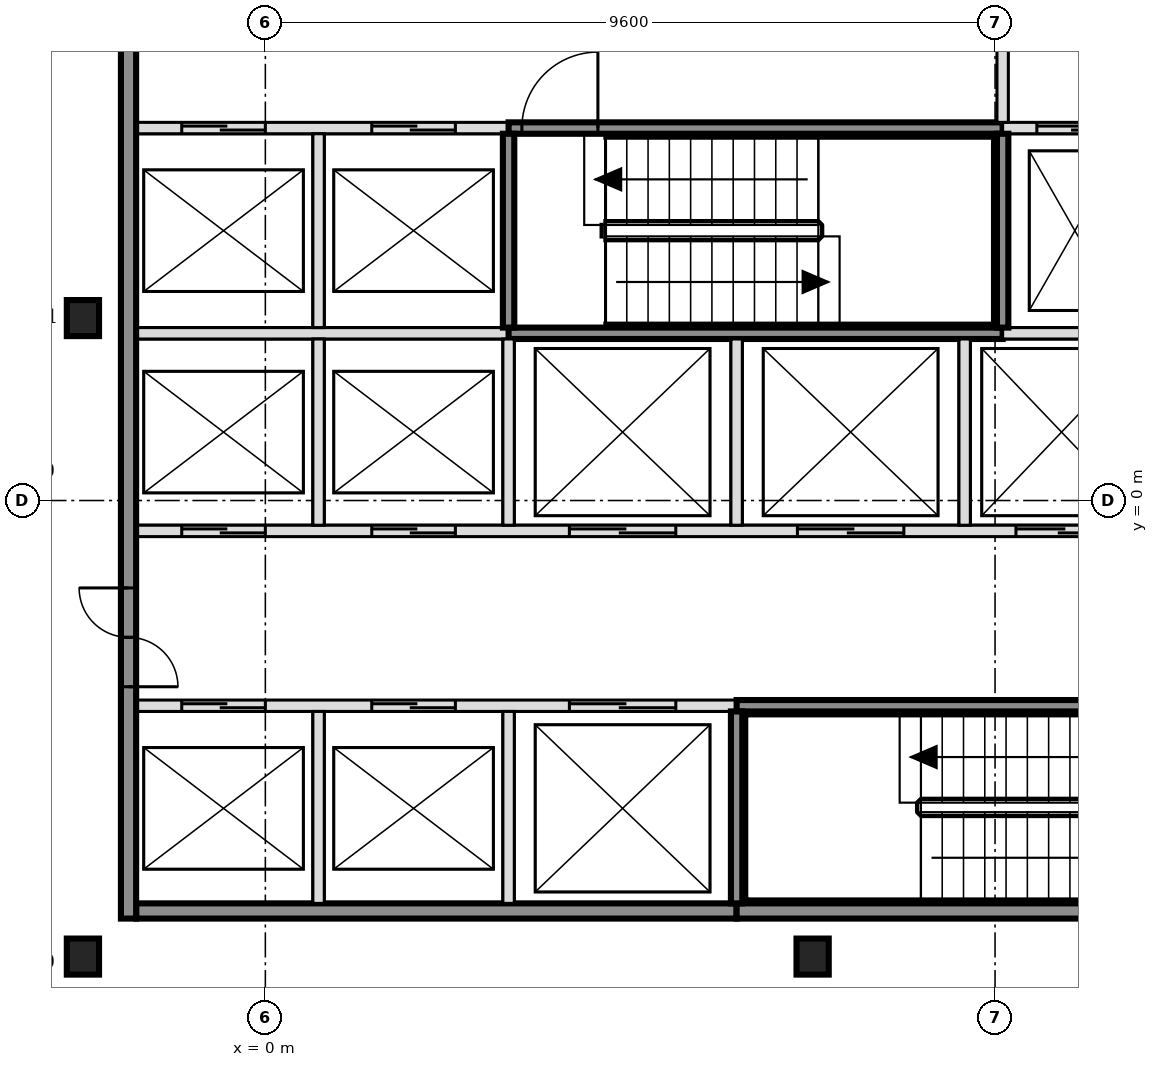
"""IFC4 building model, lengths in metres.
Left out: names, types, materials, properties, quantities, classifications, styles, units other than length and angle.
Written with IfcOpenShell. Run it as: python <this file> out.ifc"""

import sys

from ifc_helpers import new_model, si_unit, direction, frame, frame_2d, origin, origin_2d, place, context, subcontext, project, spatial, rectangle, i_section, extrude, element, fill, save


model = new_model("IFC4")
c1 = context("Model", 3, precision=1e-05, world=origin(), true_north=direction((0.0, 1.0)))
c2 = subcontext(c1, "Body", "Model", "MODEL_VIEW")
j1 = project(units=[si_unit("LENGTHUNIT", "METRE"), si_unit("PLANEANGLEUNIT", "RADIAN")], contexts=[c1])
p1 = place(None, origin())
s1 = spatial("IfcSite", under=j1, at=p1, CompositionType="ELEMENT")
p2 = place(p1, origin())
s2 = spatial("IfcBuilding", under=s1, at=p2, CompositionType="ELEMENT")
p3 = place(p2, frame((0.0, 0.0, 125.4)))
s3 = spatial("IfcBuildingStorey", under=s2, at=p3, CompositionType="ELEMENT", Elevation=125.4)
for number, where, z_axis, x_axis in (
    (1, (-2.4, -6.0, -0.15), (0.0, 0.0, 1.0), (1.0, 0.0, 0.0)),
    (2, (7.2, -6.0, -0.15), (0.0, 0.0, 1.0), (1.0, 0.0, 0.0)),
    (3, (-2.4, 2.4, -0.15), (0.0, 0.0, 1.0), (1.0, 0.0, 0.0)),
):
    element("IfcColumn", number, at=place(p3, frame(where, z_axis=z_axis, x_axis=x_axis)), inside=s3, PredefinedType="COLUMN", context=c2, shape_type="SweptSolid", body=[
        extrude(i_section(OverallWidth=0.424, OverallDepth=0.474, WebThickness=0.048, FlangeThickness=0.077, FilletRadius=0.015, at=origin_2d()), origin(), (0.0, 0.0, 1.0), 3.6),
    ])
p4 = place(p3, frame((-1.7, -5.4, 0.0), z_axis=(0.0, 0.0, 1.0), x_axis=(1.0, 0.0, 0.0)))
e4 = element("IfcWall", 4, at=p4, inside=s3, PredefinedType="SOLIDWALL", context=c2, shape_type="SweptSolid", body=[
    extrude(rectangle(XDim=7.9, YDim=0.2, at=frame_2d((3.95, 0.0))), origin(), (0.0, 0.0, 1.0), 3.45),
])
p5 = place(p3, frame((6.2, -5.4, 0.0), z_axis=(0.0, 0.0, 1.0), x_axis=(1.0, 0.0, 0.0)))
e5 = element("IfcWall", 5, at=p5, inside=s3, PredefinedType="SOLIDWALL", context=c2, shape_type="SweptSolid", body=[
    extrude(rectangle(XDim=6.5, YDim=0.2, at=frame_2d((3.25, 0.0))), origin(), (0.0, 0.0, 1.0), 3.45),
])
p6 = place(p3, frame((-1.7, -2.7, 0.0), z_axis=(0.0, 0.0, 1.0), x_axis=(1.0, 0.0, 0.0)))
e6 = element("IfcWall", 6, at=p6, inside=s3, PredefinedType="SOLIDWALL", context=c2, shape_type="SweptSolid", body=[
    extrude(rectangle(XDim=7.9, YDim=0.15, at=frame_2d((3.95, 0.0))), origin(), (0.0, 0.0, 1.0), 3.45),
])
p7 = place(p6, frame((0.6, 0.0, 0.0)))
e7 = element("IfcOpeningElement", 7, at=p7, cuts=e6, PredefinedType="OPENING", context=c2, shape_type="SweptSolid", body=[
    extrude(rectangle(XDim=1.1, YDim=2.1, at=frame_2d((0.55, 1.05))), frame((0.0, 0.085, 0.0), z_axis=(0.0, -1.0, 0.0), x_axis=(1.0, 0.0, 0.0)), (0.0, 0.0, 1.0), 0.17),
])
p8 = place(p6, frame((3.1, 0.0, 0.0)))
e8 = element("IfcOpeningElement", 8, at=p8, cuts=e6, PredefinedType="OPENING", context=c2, shape_type="SweptSolid", body=[
    extrude(rectangle(XDim=1.1, YDim=2.1, at=frame_2d((0.55, 1.05))), frame((0.0, 0.085, 0.0), z_axis=(0.0, -1.0, 0.0), x_axis=(1.0, 0.0, 0.0)), (0.0, 0.0, 1.0), 0.17),
])
p9 = place(p6, frame((5.7, 0.0, 0.0)))
e9 = element("IfcOpeningElement", 9, at=p9, cuts=e6, PredefinedType="OPENING", context=c2, shape_type="SweptSolid", body=[
    extrude(rectangle(XDim=1.4, YDim=2.1, at=frame_2d((0.7, 1.05))), frame((0.0, 0.085, 0.0), z_axis=(0.0, -1.0, 0.0), x_axis=(1.0, 0.0, 0.0)), (0.0, 0.0, 1.0), 0.17),
])
p10 = place(p3, frame((6.2, -2.7, 0.0), z_axis=(0.0, 0.0, 1.0), x_axis=(1.0, 0.0, 0.0)))
e10 = element("IfcWall", 10, at=p10, inside=s3, PredefinedType="SOLIDWALL", context=c2, shape_type="SweptSolid", body=[
    extrude(rectangle(XDim=6.425, YDim=0.15, at=frame_2d((3.212, 0.0))), origin(), (0.0, 0.0, 1.0), 3.45),
])
p11 = place(p10, frame((5.3, 0.0, 0.0)))
e11 = element("IfcOpeningElement", 11, at=p11, cuts=e10, PredefinedType="OPENING", context=c2, shape_type="SweptSolid", body=[
    extrude(rectangle(XDim=1.0, YDim=2.1, at=frame_2d((0.5, 1.05))), frame((0.0, 0.085, 0.0), z_axis=(0.0, -1.0, 0.0), x_axis=(1.0, 0.0, 0.0)), (0.0, 0.0, 1.0), 0.17),
])
p12 = place(p3, frame((-1.7, -0.4, 0.0), z_axis=(0.0, 0.0, 1.0), x_axis=(1.0, 0.0, 0.0)))
e12 = element("IfcWall", 12, at=p12, inside=s3, PredefinedType="SOLIDWALL", context=c2, shape_type="SweptSolid", body=[
    extrude(rectangle(XDim=15.925, YDim=0.15, at=frame_2d((7.962, 0.0))), origin(), (0.0, 0.0, 1.0), 3.45),
])
p13 = place(p12, frame((0.6, 0.0, 0.0)))
e13 = element("IfcOpeningElement", 13, at=p13, cuts=e12, PredefinedType="OPENING", context=c2, shape_type="SweptSolid", body=[
    extrude(rectangle(XDim=1.1, YDim=2.1, at=frame_2d((0.55, 1.05))), frame((0.0, 0.085, 0.0), z_axis=(0.0, -1.0, 0.0), x_axis=(1.0, 0.0, 0.0)), (0.0, 0.0, 1.0), 0.17),
])
p14 = place(p12, frame((3.1, 0.0, 0.0)))
e14 = element("IfcOpeningElement", 14, at=p14, cuts=e12, PredefinedType="OPENING", context=c2, shape_type="SweptSolid", body=[
    extrude(rectangle(XDim=1.1, YDim=2.1, at=frame_2d((0.55, 1.05))), frame((0.0, 0.085, 0.0), z_axis=(0.0, -1.0, 0.0), x_axis=(1.0, 0.0, 0.0)), (0.0, 0.0, 1.0), 0.17),
])
p15 = place(p12, frame((5.7, 0.0, 0.0)))
e15 = element("IfcOpeningElement", 15, at=p15, cuts=e12, PredefinedType="OPENING", context=c2, shape_type="SweptSolid", body=[
    extrude(rectangle(XDim=1.4, YDim=2.1, at=frame_2d((0.7, 1.05))), frame((0.0, 0.085, 0.0), z_axis=(0.0, -1.0, 0.0), x_axis=(1.0, 0.0, 0.0)), (0.0, 0.0, 1.0), 0.17),
])
p16 = place(p12, frame((8.7, 0.0, 0.0)))
e16 = element("IfcOpeningElement", 16, at=p16, cuts=e12, PredefinedType="OPENING", context=c2, shape_type="SweptSolid", body=[
    extrude(rectangle(XDim=1.4, YDim=2.1, at=frame_2d((0.7, 1.05))), frame((0.0, 0.085, 0.0), z_axis=(0.0, -1.0, 0.0), x_axis=(1.0, 0.0, 0.0)), (0.0, 0.0, 1.0), 0.17),
])
p17 = place(p12, frame((11.575, 0.0, 0.0)))
e17 = element("IfcOpeningElement", 17, at=p17, cuts=e12, PredefinedType="OPENING", context=c2, shape_type="SweptSolid", body=[
    extrude(rectangle(XDim=1.2, YDim=2.1, at=frame_2d((0.6, 1.05))), frame((0.0, 0.085, 0.0), z_axis=(0.0, -1.0, 0.0), x_axis=(1.0, 0.0, 0.0)), (0.0, 0.0, 1.0), 0.17),
])
p18 = place(p12, frame((14.125, 0.0, 0.0)))
e18 = element("IfcOpeningElement", 18, at=p18, cuts=e12, PredefinedType="OPENING", context=c2, shape_type="SweptSolid", body=[
    extrude(rectangle(XDim=1.2, YDim=2.1, at=frame_2d((0.6, 1.05))), frame((0.0, 0.085, 0.0), z_axis=(0.0, -1.0, 0.0), x_axis=(1.0, 0.0, 0.0)), (0.0, 0.0, 1.0), 0.17),
])
p19 = place(p3, frame((-1.7, 2.2, 0.0), z_axis=(0.0, 0.0, 1.0), x_axis=(1.0, 0.0, 0.0)))
e19 = element("IfcWall", 19, at=p19, inside=s3, PredefinedType="SOLIDWALL", context=c2, shape_type="SweptSolid", body=[
    extrude(rectangle(XDim=4.9, YDim=0.15, at=frame_2d((2.45, 0.0))), origin(), (0.0, 0.0, 1.0), 3.45),
])
p20 = place(p3, frame((3.2, 2.2, 0.0), z_axis=(0.0, 0.0, 1.0), x_axis=(1.0, 0.0, 0.0)))
e20 = element("IfcWall", 20, at=p20, inside=s3, PredefinedType="SOLIDWALL", context=c2, shape_type="SweptSolid", body=[
    extrude(rectangle(XDim=6.5, YDim=0.15, at=frame_2d((3.25, 0.0))), origin(), (0.0, 0.0, 1.0), 3.45),
])
p21 = place(p3, frame((9.7, 2.2, 0.0), z_axis=(0.0, 0.0, 1.0), x_axis=(1.0, 0.0, 0.0)))
e21 = element("IfcWall", 21, at=p21, inside=s3, PredefinedType="SOLIDWALL", context=c2, shape_type="SweptSolid", body=[
    extrude(rectangle(XDim=4.525, YDim=0.15, at=frame_2d((2.263, 0.0))), origin(), (0.0, 0.0, 1.0), 3.45),
])
p22 = place(p3, frame((-1.7, 4.9, 0.0), z_axis=(0.0, 0.0, 1.0), x_axis=(1.0, 0.0, 0.0)))
e22 = element("IfcWall", 22, at=p22, inside=s3, PredefinedType="SOLIDWALL", context=c2, shape_type="SweptSolid", body=[
    extrude(rectangle(XDim=4.9, YDim=0.15, at=frame_2d((2.45, 0.0))), origin(), (0.0, 0.0, 1.0), 3.45),
])
p23 = place(p22, frame((0.6, 0.0, 0.0)))
e23 = element("IfcOpeningElement", 23, at=p23, cuts=e22, PredefinedType="OPENING", context=c2, shape_type="SweptSolid", body=[
    extrude(rectangle(XDim=1.1, YDim=2.1, at=frame_2d((0.55, 1.05))), frame((0.0, 0.085, 0.0), z_axis=(0.0, -1.0, 0.0), x_axis=(1.0, 0.0, 0.0)), (0.0, 0.0, 1.0), 0.17),
])
p24 = place(p22, frame((3.1, 0.0, 0.0)))
e24 = element("IfcOpeningElement", 24, at=p24, cuts=e22, PredefinedType="OPENING", context=c2, shape_type="SweptSolid", body=[
    extrude(rectangle(XDim=1.1, YDim=2.1, at=frame_2d((0.55, 1.05))), frame((0.0, 0.085, 0.0), z_axis=(0.0, -1.0, 0.0), x_axis=(1.0, 0.0, 0.0)), (0.0, 0.0, 1.0), 0.17),
])
p25 = place(p3, frame((3.2, 4.9, 0.0), z_axis=(0.0, 0.0, 1.0), x_axis=(1.0, 0.0, 0.0)))
e25 = element("IfcWall", 25, at=p25, inside=s3, PredefinedType="SOLIDWALL", context=c2, shape_type="SweptSolid", body=[
    extrude(rectangle(XDim=6.5, YDim=0.15, at=frame_2d((3.25, 0.0))), origin(), (0.0, 0.0, 1.0), 3.45),
])
p26 = place(p25, frame((0.175, 0.0, 0.0)))
e26 = element("IfcOpeningElement", 26, at=p26, cuts=e25, PredefinedType="OPENING", context=c2, shape_type="SweptSolid", body=[
    extrude(rectangle(XDim=1.0, YDim=2.1, at=frame_2d((0.5, 1.05))), frame((0.0, 0.085, 0.0), z_axis=(0.0, -1.0, 0.0), x_axis=(1.0, 0.0, 0.0)), (0.0, 0.0, 1.0), 0.17),
])
p27 = place(p3, frame((9.7, 4.9, 0.0), z_axis=(0.0, 0.0, 1.0), x_axis=(1.0, 0.0, 0.0)))
e27 = element("IfcWall", 27, at=p27, inside=s3, PredefinedType="SOLIDWALL", context=c2, shape_type="SweptSolid", body=[
    extrude(rectangle(XDim=6.4, YDim=0.15, at=frame_2d((3.2, 0.0))), origin(), (0.0, 0.0, 1.0), 3.45),
])
p28 = place(p27, frame((0.45, 0.0, 0.0)))
e28 = element("IfcOpeningElement", 28, at=p28, cuts=e27, PredefinedType="OPENING", context=c2, shape_type="SweptSolid", body=[
    extrude(rectangle(XDim=1.0, YDim=2.1, at=frame_2d((0.5, 1.05))), frame((0.0, 0.085, 0.0), z_axis=(0.0, -1.0, 0.0), x_axis=(1.0, 0.0, 0.0)), (0.0, 0.0, 1.0), 0.17),
])
p29 = place(p27, frame((2.35, 0.0, 0.0)))
e29 = element("IfcOpeningElement", 29, at=p29, cuts=e27, PredefinedType="OPENING", context=c2, shape_type="SweptSolid", body=[
    extrude(rectangle(XDim=1.0, YDim=2.1, at=frame_2d((0.5, 1.05))), frame((0.0, 0.085, 0.0), z_axis=(0.0, -1.0, 0.0), x_axis=(1.0, 0.0, 0.0)), (0.0, 0.0, 1.0), 0.17),
])
p30 = place(p27, frame((4.7, 0.0, 0.0)))
e30 = element("IfcOpeningElement", 30, at=p30, cuts=e27, PredefinedType="OPENING", context=c2, shape_type="SweptSolid", body=[
    extrude(rectangle(XDim=0.9, YDim=2.1, at=frame_2d((0.45, 1.05))), frame((0.0, 0.085, 0.0), z_axis=(0.0, -1.0, 0.0), x_axis=(1.0, 0.0, 0.0)), (0.0, 0.0, 1.0), 0.17),
])
p31 = place(p3, frame((-1.8, -5.5, 0.0), z_axis=(0.0, 0.0, 1.0), x_axis=(0.0, 1.0, 0.0)))
e31 = element("IfcWall", 31, at=p31, inside=s3, PredefinedType="SOLIDWALL", context=c2, shape_type="SweptSolid", body=[
    extrude(rectangle(XDim=15.8, YDim=0.2, at=frame_2d((7.9, 0.0))), origin(), (0.0, 0.0, 1.0), 3.45),
])
p32 = place(p31, frame((3.05, 0.0, 0.0)))
e32 = element("IfcOpeningElement", 32, at=p32, cuts=e31, PredefinedType="OPENING", context=c2, shape_type="SweptSolid", body=[
    extrude(rectangle(XDim=1.3, YDim=2.1, at=frame_2d((0.65, 1.05))), frame((0.0, 0.11, 0.0), z_axis=(0.0, -1.0, 0.0), x_axis=(1.0, 0.0, 0.0)), (0.0, 0.0, 1.0), 0.22),
])
p33 = place(p31, frame((11.45, 0.0, 0.0)))
e33 = element("IfcOpeningElement", 33, at=p33, cuts=e31, PredefinedType="OPENING", context=c2, shape_type="SweptSolid", body=[
    extrude(rectangle(XDim=1.3, YDim=2.1, at=frame_2d((0.65, 1.05))), frame((0.0, 0.11, 0.0), z_axis=(0.0, -1.0, 0.0), x_axis=(1.0, 0.0, 0.0)), (0.0, 0.0, 1.0), 0.22),
])
p34 = place(p3, frame((0.7, -5.3, 0.0), z_axis=(0.0, 0.0, 1.0), x_axis=(0.0, 1.0, 0.0)))
e34 = element("IfcWall", 34, at=p34, inside=s3, PredefinedType="SOLIDWALL", context=c2, shape_type="SweptSolid", body=[
    extrude(rectangle(XDim=2.525, YDim=0.15, at=frame_2d((1.263, 0.0))), origin(), (0.0, 0.0, 1.0), 3.45),
])
p35 = place(p3, frame((0.7, -0.325, 0.0), z_axis=(0.0, 0.0, 1.0), x_axis=(0.0, 1.0, 0.0)))
e35 = element("IfcWall", 35, at=p35, inside=s3, PredefinedType="SOLIDWALL", context=c2, shape_type="SweptSolid", body=[
    extrude(rectangle(XDim=2.45, YDim=0.15, at=frame_2d((1.225, 0.0))), origin(), (0.0, 0.0, 1.0), 3.45),
])
p36 = place(p3, frame((0.7, 2.275, 0.0), z_axis=(0.0, 0.0, 1.0), x_axis=(0.0, 1.0, 0.0)))
e36 = element("IfcWall", 36, at=p36, inside=s3, PredefinedType="SOLIDWALL", context=c2, shape_type="SweptSolid", body=[
    extrude(rectangle(XDim=2.55, YDim=0.15, at=frame_2d((1.275, 0.0))), origin(), (0.0, 0.0, 1.0), 3.45),
])
p37 = place(p3, frame((3.2, -5.3, 0.0), z_axis=(0.0, 0.0, 1.0), x_axis=(0.0, 1.0, 0.0)))
e37 = element("IfcWall", 37, at=p37, inside=s3, PredefinedType="SOLIDWALL", context=c2, shape_type="SweptSolid", body=[
    extrude(rectangle(XDim=2.525, YDim=0.15, at=frame_2d((1.263, 0.0))), origin(), (0.0, 0.0, 1.0), 3.45),
])
p38 = place(p3, frame((3.2, -0.325, 0.0), z_axis=(0.0, 0.0, 1.0), x_axis=(0.0, 1.0, 0.0)))
e38 = element("IfcWall", 38, at=p38, inside=s3, PredefinedType="SOLIDWALL", context=c2, shape_type="SweptSolid", body=[
    extrude(rectangle(XDim=2.45, YDim=0.15, at=frame_2d((1.225, 0.0))), origin(), (0.0, 0.0, 1.0), 3.45),
])
p39 = place(p3, frame((3.2, 2.275, 0.0), z_axis=(0.0, 0.0, 1.0), x_axis=(0.0, 1.0, 0.0)))
e39 = element("IfcWall", 39, at=p39, inside=s3, PredefinedType="SOLIDWALL", context=c2, shape_type="SweptSolid", body=[
    extrude(rectangle(XDim=2.55, YDim=0.15, at=frame_2d((1.275, 0.0))), origin(), (0.0, 0.0, 1.0), 3.45),
])
p40 = place(p3, frame((6.2, -5.3, 0.0), z_axis=(0.0, 0.0, 1.0), x_axis=(0.0, 1.0, 0.0)))
e40 = element("IfcWall", 40, at=p40, inside=s3, PredefinedType="SOLIDWALL", context=c2, shape_type="SweptSolid", body=[
    extrude(rectangle(XDim=2.525, YDim=0.15, at=frame_2d((1.263, 0.0))), origin(), (0.0, 0.0, 1.0), 3.45),
])
for number, where, z_axis, x_axis in (
    (41, (6.2, -0.325, 0.0), (0.0, 0.0, 1.0), (0.0, 1.0, 0.0)),
    (42, (9.2, -0.325, 0.0), (0.0, 0.0, 1.0), (0.0, 1.0, 0.0)),
):
    element("IfcWall", number, at=place(p3, frame(where, z_axis=z_axis, x_axis=x_axis)), inside=s3, PredefinedType="SOLIDWALL", context=c2, shape_type="SweptSolid", body=[
        extrude(rectangle(XDim=2.45, YDim=0.15, at=frame_2d((1.225, 0.0))), origin(), (0.0, 0.0, 1.0), 3.45),
    ])
p41 = place(p3, frame((9.7, 2.275, 0.0), z_axis=(0.0, 0.0, 1.0), x_axis=(0.0, 1.0, 0.0)))
e43 = element("IfcWall", 43, at=p41, inside=s3, PredefinedType="SOLIDWALL", context=c2, shape_type="SweptSolid", body=[
    extrude(rectangle(XDim=2.55, YDim=0.15, at=frame_2d((1.275, 0.0))), origin(), (0.0, 0.0, 1.0), 3.45),
])
p42 = place(p3, frame((9.7, 4.975, 0.0), z_axis=(0.0, 0.0, 1.0), x_axis=(0.0, 1.0, 0.0)))
e44 = element("IfcWall", 44, at=p42, inside=s3, PredefinedType="SOLIDWALL", context=c2, shape_type="SweptSolid", body=[
    extrude(rectangle(XDim=2.45, YDim=0.15, at=frame_2d((1.225, 0.0))), origin(), (0.0, 0.0, 1.0), 3.45),
])
p43 = place(p7, origin())
e45 = element("IfcDoor", 45, at=p43, inside=s3, OperationType="DOUBLE_DOOR_SLIDING", PredefinedType="DOOR", context=c2, shape_type="SweptSolid", body=[
    extrude(rectangle(XDim=1.1, YDim=2.1, at=frame_2d((0.55, 1.05))), frame((0.0, 0.025, 0.0), z_axis=(0.0, -1.0, 0.0), x_axis=(1.0, 0.0, 0.0)), (0.0, 0.0, 1.0), 0.05),
])
fill(e7, e45)
p44 = place(p8, origin())
e46 = element("IfcDoor", 46, at=p44, inside=s3, OperationType="DOUBLE_DOOR_SLIDING", PredefinedType="DOOR", context=c2, shape_type="SweptSolid", body=[
    extrude(rectangle(XDim=1.1, YDim=2.1, at=frame_2d((0.55, 1.05))), frame((0.0, 0.025, 0.0), z_axis=(0.0, -1.0, 0.0), x_axis=(1.0, 0.0, 0.0)), (0.0, 0.0, 1.0), 0.05),
])
fill(e8, e46)
p45 = place(p13, origin())
e47 = element("IfcDoor", 47, at=p45, inside=s3, OperationType="DOUBLE_DOOR_SLIDING", PredefinedType="DOOR", context=c2, shape_type="SweptSolid", body=[
    extrude(rectangle(XDim=1.1, YDim=2.1, at=frame_2d((0.55, 1.05))), frame((0.0, 0.025, 0.0), z_axis=(0.0, -1.0, 0.0), x_axis=(1.0, 0.0, 0.0)), (0.0, 0.0, 1.0), 0.05),
])
fill(e13, e47)
p46 = place(p14, origin())
e48 = element("IfcDoor", 48, at=p46, inside=s3, OperationType="DOUBLE_DOOR_SLIDING", PredefinedType="DOOR", context=c2, shape_type="SweptSolid", body=[
    extrude(rectangle(XDim=1.1, YDim=2.1, at=frame_2d((0.55, 1.05))), frame((0.0, 0.025, 0.0), z_axis=(0.0, -1.0, 0.0), x_axis=(1.0, 0.0, 0.0)), (0.0, 0.0, 1.0), 0.05),
])
fill(e14, e48)
p47 = place(p9, origin())
e49 = element("IfcDoor", 49, at=p47, inside=s3, OperationType="DOUBLE_DOOR_SLIDING", PredefinedType="DOOR", context=c2, shape_type="SweptSolid", body=[
    extrude(rectangle(XDim=1.4, YDim=2.1, at=frame_2d((0.7, 1.05))), frame((0.0, 0.025, 0.0), z_axis=(0.0, -1.0, 0.0), x_axis=(1.0, 0.0, 0.0)), (0.0, 0.0, 1.0), 0.05),
])
fill(e9, e49)
p48 = place(p15, origin())
e50 = element("IfcDoor", 50, at=p48, inside=s3, OperationType="DOUBLE_DOOR_SLIDING", PredefinedType="DOOR", context=c2, shape_type="SweptSolid", body=[
    extrude(rectangle(XDim=1.4, YDim=2.1, at=frame_2d((0.7, 1.05))), frame((0.0, 0.025, 0.0), z_axis=(0.0, -1.0, 0.0), x_axis=(1.0, 0.0, 0.0)), (0.0, 0.0, 1.0), 0.05),
])
fill(e15, e50)
p49 = place(p16, origin())
e51 = element("IfcDoor", 51, at=p49, inside=s3, OperationType="DOUBLE_DOOR_SLIDING", PredefinedType="DOOR", context=c2, shape_type="SweptSolid", body=[
    extrude(rectangle(XDim=1.4, YDim=2.1, at=frame_2d((0.7, 1.05))), frame((0.0, 0.025, 0.0), z_axis=(0.0, -1.0, 0.0), x_axis=(1.0, 0.0, 0.0)), (0.0, 0.0, 1.0), 0.05),
])
fill(e16, e51)
p50 = place(p17, origin())
e52 = element("IfcDoor", 52, at=p50, inside=s3, OperationType="DOUBLE_DOOR_SLIDING", PredefinedType="DOOR", context=c2, shape_type="SweptSolid", body=[
    extrude(rectangle(XDim=1.2, YDim=2.1, at=frame_2d((0.6, 1.05))), frame((0.0, 0.025, 0.0), z_axis=(0.0, -1.0, 0.0), x_axis=(1.0, 0.0, 0.0)), (0.0, 0.0, 1.0), 0.05),
])
fill(e17, e52)
p51 = place(p23, origin())
e53 = element("IfcDoor", 53, at=p51, inside=s3, OperationType="DOUBLE_DOOR_SLIDING", PredefinedType="DOOR", context=c2, shape_type="SweptSolid", body=[
    extrude(rectangle(XDim=1.1, YDim=2.1, at=frame_2d((0.55, 1.05))), frame((0.0, 0.025, 0.0), z_axis=(0.0, -1.0, 0.0), x_axis=(1.0, 0.0, 0.0)), (0.0, 0.0, 1.0), 0.05),
])
fill(e23, e53)
p52 = place(p24, origin())
e54 = element("IfcDoor", 54, at=p52, inside=s3, OperationType="DOUBLE_DOOR_SLIDING", PredefinedType="DOOR", context=c2, shape_type="SweptSolid", body=[
    extrude(rectangle(XDim=1.1, YDim=2.1, at=frame_2d((0.55, 1.05))), frame((0.0, 0.025, 0.0), z_axis=(0.0, -1.0, 0.0), x_axis=(1.0, 0.0, 0.0)), (0.0, 0.0, 1.0), 0.05),
])
fill(e24, e54)
p53 = place(p28, origin())
e55 = element("IfcDoor", 55, at=p53, inside=s3, OperationType="DOUBLE_DOOR_SLIDING", PredefinedType="DOOR", context=c2, shape_type="SweptSolid", body=[
    extrude(rectangle(XDim=1.0, YDim=2.1, at=frame_2d((0.5, 1.05))), frame((0.0, 0.025, 0.0), z_axis=(0.0, -1.0, 0.0), x_axis=(1.0, 0.0, 0.0)), (0.0, 0.0, 1.0), 0.05),
])
fill(e28, e55)
p54 = place(p26, origin())
e56 = element("IfcDoor", 56, at=p54, inside=s3, OperationType="SINGLE_SWING_RIGHT", PredefinedType="DOOR", context=c2, shape_type="SweptSolid", body=[
    extrude(rectangle(XDim=1.0, YDim=2.1, at=frame_2d((0.5, 1.05))), frame((0.0, 0.025, 0.0), z_axis=(0.0, -1.0, 0.0), x_axis=(1.0, 0.0, 0.0)), (0.0, 0.0, 1.0), 0.05),
])
fill(e26, e56)
p55 = place(p32, origin())
e57 = element("IfcDoor", 57, at=p55, inside=s3, OperationType="DOUBLE_DOOR_SINGLE_SWING", PredefinedType="DOOR", context=c2, shape_type="SweptSolid", body=[
    extrude(rectangle(XDim=1.3, YDim=2.1, at=frame_2d((0.65, 1.05))), frame((0.0, 0.025, 0.0), z_axis=(0.0, -1.0, 0.0), x_axis=(1.0, 0.0, 0.0)), (0.0, 0.0, 1.0), 0.05),
])
fill(e32, e57)
save(model, sys.argv[1])
